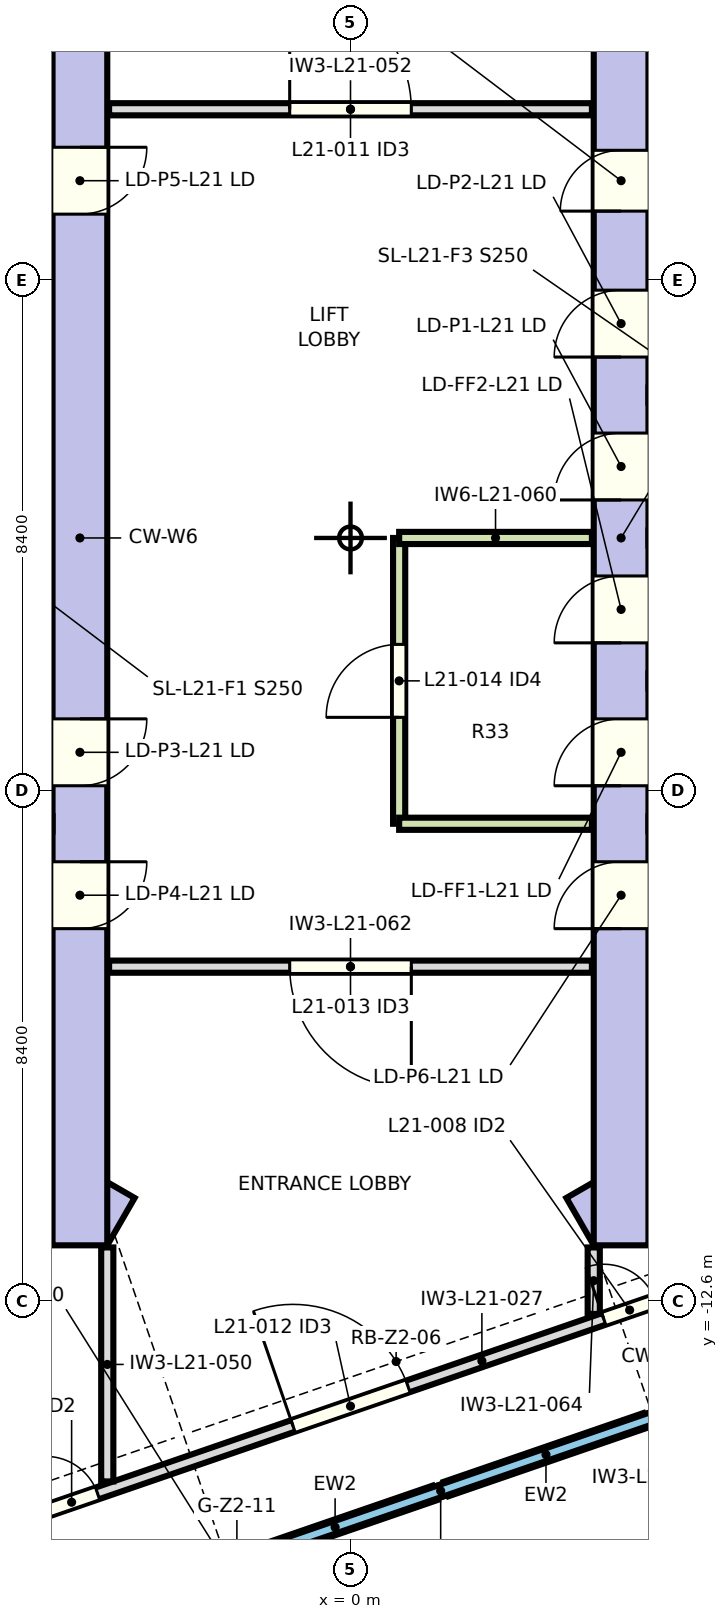
"""IFC4 building model, lengths in metres.
Left out: names, types, materials, properties, quantities, classifications, styles, units other than length and angle.
Written with IfcOpenShell. Run it as: python <this file> out.ifc"""

import sys

from ifc_helpers import new_model, si_unit, direction, frame, frame_2d, origin, place, context, subcontext, project, spatial, rectangle, extrude, element, fill, save


model = new_model("IFC4")
c1 = context("Model", 3, precision=1e-05, world=origin(), true_north=direction((0.0, 1.0)))
c2 = subcontext(c1, "Body", "Model", "MODEL_VIEW")
j1 = project(units=[si_unit("LENGTHUNIT", "METRE"), si_unit("PLANEANGLEUNIT", "RADIAN")], contexts=[c1])
p1 = place(None, origin())
s1 = spatial("IfcSite", under=j1, at=p1, CompositionType="ELEMENT")
p2 = place(p1, origin())
s2 = spatial("IfcBuilding", under=s1, at=p2, CompositionType="ELEMENT")
p3 = place(p2, frame((0.0, 0.0, 107.9)))
s3 = spatial("IfcBuildingStorey", under=s2, at=p3, CompositionType="ELEMENT", Elevation=107.9)
p4 = place(p3, frame((-3.775, -11.243, 0.0), z_axis=(0.0, 0.0, 1.0), x_axis=(-0.866026961591, 0.49999730179, 0.0)))
e1 = element("IfcWall", 1, at=p4, inside=s3, PredefinedType="SHEAR", context=c2, shape_type="SweptSolid", body=[
    extrude(rectangle(XDim=5.587, YDim=0.9, at=frame_2d((2.794, 0.0))), origin(), (0.0, 0.0, 1.0), 3.8),
])
p5 = place(p3, frame((-4.45, 11.633, 0.0), z_axis=(0.0, 0.0, 1.0), x_axis=(0.0, -1.0, 0.0)))
e2 = element("IfcWall", 2, at=p5, inside=s3, PredefinedType="SHEAR", context=c2, shape_type="SweptSolid", body=[
    extrude(rectangle(XDim=23.265, YDim=0.9, at=frame_2d((11.633, 0.0))), origin(), (0.0, 0.0, 1.0), 3.8),
])
p6 = place(p5, frame((14.607, 0.0, 0.0)))
e3 = element("IfcOpeningElement", 3, at=p6, cuts=e2, PredefinedType="OPENING", context=c2, shape_type="SweptSolid", body=[
    extrude(rectangle(XDim=1.1, YDim=2.1, at=frame_2d((0.55, 1.05))), frame((0.0, 0.46, 0.0), z_axis=(0.0, -1.0, 0.0), x_axis=(1.0, 0.0, 0.0)), (0.0, 0.0, 1.0), 0.92),
])
p7 = place(p5, frame((16.958, 0.0, 0.0)))
e4 = element("IfcOpeningElement", 4, at=p7, cuts=e2, PredefinedType="OPENING", context=c2, shape_type="SweptSolid", body=[
    extrude(rectangle(XDim=1.1, YDim=2.1, at=frame_2d((0.55, 1.05))), frame((0.0, 0.46, 0.0), z_axis=(0.0, -1.0, 0.0), x_axis=(1.0, 0.0, 0.0)), (0.0, 0.0, 1.0), 0.92),
])
p8 = place(p5, frame((5.208, 0.0, 0.0)))
e5 = element("IfcOpeningElement", 5, at=p8, cuts=e2, PredefinedType="OPENING", context=c2, shape_type="SweptSolid", body=[
    extrude(rectangle(XDim=1.1, YDim=2.1, at=frame_2d((0.55, 1.05))), frame((0.0, 0.46, 0.0), z_axis=(0.0, -1.0, 0.0), x_axis=(1.0, 0.0, 0.0)), (0.0, 0.0, 1.0), 0.92),
])
p9 = place(p3, frame((8.614, -8.449, 0.0), z_axis=(0.0, 0.0, 1.0), x_axis=(-0.866026961591, -0.49999730179, 0.0)))
e6 = element("IfcWall", 6, at=p9, inside=s3, PredefinedType="SHEAR", context=c2, shape_type="SweptSolid", body=[
    extrude(rectangle(XDim=5.587, YDim=0.9, at=frame_2d((2.794, 0.0))), origin(), (0.0, 0.0, 1.0), 3.8),
])
p10 = place(p3, frame((4.45, -11.633, 0.0), z_axis=(0.0, 0.0, 1.0), x_axis=(0.0, 1.0, 0.0)))
e7 = element("IfcWall", 7, at=p10, inside=s3, PredefinedType="SHEAR", context=c2, shape_type="SweptSolid", body=[
    extrude(rectangle(XDim=23.265, YDim=0.9, at=frame_2d((11.633, 0.0))), origin(), (0.0, 0.0, 1.0), 3.8),
])
p11 = place(p10, frame((7.558, 0.0, 0.0)))
e8 = element("IfcOpeningElement", 8, at=p11, cuts=e7, PredefinedType="OPENING", context=c2, shape_type="SweptSolid", body=[
    extrude(rectangle(XDim=1.1, YDim=2.1, at=frame_2d((0.55, 1.05))), frame((0.0, 0.46, 0.0), z_axis=(0.0, -1.0, 0.0), x_axis=(1.0, 0.0, 0.0)), (0.0, 0.0, 1.0), 0.92),
])
p12 = place(p10, frame((9.907, 0.0, 0.0)))
e9 = element("IfcOpeningElement", 9, at=p12, cuts=e7, PredefinedType="OPENING", context=c2, shape_type="SweptSolid", body=[
    extrude(rectangle(XDim=1.1, YDim=2.1, at=frame_2d((0.55, 1.05))), frame((0.0, 0.46, 0.0), z_axis=(0.0, -1.0, 0.0), x_axis=(1.0, 0.0, 0.0)), (0.0, 0.0, 1.0), 0.92),
])
p13 = place(p10, frame((12.258, 0.0, 0.0)))
e10 = element("IfcOpeningElement", 10, at=p13, cuts=e7, PredefinedType="OPENING", context=c2, shape_type="SweptSolid", body=[
    extrude(rectangle(XDim=1.1, YDim=2.1, at=frame_2d((0.55, 1.05))), frame((0.0, 0.46, 0.0), z_axis=(0.0, -1.0, 0.0), x_axis=(1.0, 0.0, 0.0)), (0.0, 0.0, 1.0), 0.92),
])
p14 = place(p10, frame((14.607, 0.0, 0.0)))
e11 = element("IfcOpeningElement", 11, at=p14, cuts=e7, PredefinedType="OPENING", context=c2, shape_type="SweptSolid", body=[
    extrude(rectangle(XDim=1.1, YDim=2.1, at=frame_2d((0.55, 1.05))), frame((0.0, 0.46, 0.0), z_axis=(0.0, -1.0, 0.0), x_axis=(1.0, 0.0, 0.0)), (0.0, 0.0, 1.0), 0.92),
])
p15 = place(p10, frame((5.208, 0.0, 0.0)))
e12 = element("IfcOpeningElement", 12, at=p15, cuts=e7, PredefinedType="OPENING", context=c2, shape_type="SweptSolid", body=[
    extrude(rectangle(XDim=1.1, YDim=2.1, at=frame_2d((0.55, 1.05))), frame((0.0, 0.46, 0.0), z_axis=(0.0, -1.0, 0.0), x_axis=(1.0, 0.0, 0.0)), (0.0, 0.0, 1.0), 0.92),
])
p16 = place(p10, frame((17.008, 0.0, 0.0)))
e13 = element("IfcOpeningElement", 13, at=p16, cuts=e7, PredefinedType="OPENING", context=c2, shape_type="SweptSolid", body=[
    extrude(rectangle(XDim=1.0, YDim=2.1, at=frame_2d((0.5, 1.05))), frame((0.0, 0.46, 0.0), z_axis=(0.0, -1.0, 0.0), x_axis=(1.0, 0.0, 0.0)), (0.0, 0.0, 1.0), 0.92),
])
p17 = place(p3, frame((-1.897, -16.835, 2.868), z_axis=(0.0, 0.0, 1.0), x_axis=(0.945520584071, 0.325562321375, 0.0)))
e14 = element("IfcWall", 14, at=p17, inside=s3, PredefinedType="SOLIDWALL", context=c2, shape_type="SweptSolid", body=[
    extrude(rectangle(XDim=3.478, YDim=0.25, at=frame_2d((1.739, 0.0))), origin(), (0.0, 0.0, 1.0), 0.632),
])
p18 = place(p3, frame((1.574, -15.639, 2.868), z_axis=(0.0, 0.0, 1.0), x_axis=(0.94551947433, 0.325565544343, 0.0)))
e15 = element("IfcWall", 15, at=p18, inside=s3, PredefinedType="SOLIDWALL", context=c2, shape_type="SweptSolid", body=[
    extrude(rectangle(XDim=3.469, YDim=0.25, at=frame_2d((1.734, 0.0))), origin(), (0.0, 0.0, 1.0), 0.632),
])
p19 = place(p3, frame((1.391, -15.703, 0.0), z_axis=(0.0, 0.0, 1.0), x_axis=(0.945359603561, 0.326029477127, 0.0)))
e16 = element("IfcWall", 16, at=p19, inside=s3, PredefinedType="PARTITIONING", context=c2, shape_type="SweptSolid", body=[
    extrude(rectangle(XDim=0.194, YDim=0.2, at=frame_2d((0.097, 0.0))), origin(), (0.0, 0.0, 1.0), 3.55),
])
p20 = place(p3, frame((4.854, -14.51, 0.0), z_axis=(0.0, 0.0, 1.0), x_axis=(0.945634074283, 0.325232528438, 0.0)))
e17 = element("IfcWall", 17, at=p20, inside=s3, PredefinedType="PARTITIONING", context=c2, shape_type="SweptSolid", body=[
    extrude(rectangle(XDim=0.268, YDim=0.2, at=frame_2d((0.134, 0.0))), origin(), (0.0, 0.0, 1.0), 3.55),
])
p21 = place(p3, frame((-11.49, -18.234, 0.0), z_axis=(0.0, 0.0, 1.0), x_axis=(0.945519622926, 0.325565112782, 0.0)))
e18 = element("IfcWall", 18, at=p21, inside=s3, PredefinedType="PARTITIONING", context=c2, shape_type="SweptSolid", body=[
    extrude(rectangle(XDim=28.873, YDim=0.2, at=frame_2d((14.437, 0.0))), origin(), (0.0, 0.0, 1.0), 3.55),
])
p22 = place(p21, frame((6.851, 0.0, 0.0)))
e19 = element("IfcOpeningElement", 19, at=p22, cuts=e18, PredefinedType="OPENING", context=c2, shape_type="SweptSolid", body=[
    extrude(rectangle(XDim=0.9, YDim=2.1, at=frame_2d((0.45, 1.05))), frame((0.0, 0.11, 0.0), z_axis=(0.0, -1.0, 0.0), x_axis=(1.0, 0.0, 0.0)), (0.0, 0.0, 1.0), 0.22),
])
p23 = place(p21, frame((16.557, 0.0, 0.0)))
e20 = element("IfcOpeningElement", 20, at=p23, cuts=e18, PredefinedType="OPENING", context=c2, shape_type="SweptSolid", body=[
    extrude(rectangle(XDim=0.9, YDim=2.1, at=frame_2d((0.45, 1.05))), frame((0.0, 0.11, 0.0), z_axis=(0.0, -1.0, 0.0), x_axis=(1.0, 0.0, 0.0)), (0.0, 0.0, 1.0), 0.22),
])
p24 = place(p21, frame((11.152, 0.0, 0.0)))
e21 = element("IfcOpeningElement", 21, at=p24, cuts=e18, PredefinedType="OPENING", context=c2, shape_type="SweptSolid", body=[
    extrude(rectangle(XDim=2.0, YDim=2.1, at=frame_2d((1.0, 1.05))), frame((0.0, 0.11, 0.0), z_axis=(0.0, -1.0, 0.0), x_axis=(1.0, 0.0, 0.0)), (0.0, 0.0, 1.0), 0.22),
])
p25 = place(p3, frame((-4.0, -11.667, 0.0), z_axis=(0.0, 0.0, 1.0), x_axis=(0.0, -1.0, 0.0)))
e22 = element("IfcWall", 22, at=p25, inside=s3, PredefinedType="PARTITIONING", context=c2, shape_type="SweptSolid", body=[
    extrude(rectangle(XDim=3.848, YDim=0.2, at=frame_2d((1.924, 0.0))), origin(), (0.0, 0.0, 1.0), 3.55),
])
p26 = place(p3, frame((-3.97, 7.05, 0.0), z_axis=(0.0, 0.0, 1.0), x_axis=(1.0, 0.0, 0.0)))
e23 = element("IfcWall", 23, at=p26, inside=s3, PredefinedType="PARTITIONING", context=c2, shape_type="SweptSolid", body=[
    extrude(rectangle(XDim=7.94, YDim=0.2, at=frame_2d((3.97, 0.0))), origin(), (0.0, 0.0, 1.0), 3.55),
])
p27 = place(p26, frame((2.97, 0.0, 0.0)))
e24 = element("IfcOpeningElement", 24, at=p27, cuts=e23, PredefinedType="OPENING", context=c2, shape_type="SweptSolid", body=[
    extrude(rectangle(XDim=2.0, YDim=2.1, at=frame_2d((1.0, 1.05))), frame((0.0, 0.11, 0.0), z_axis=(0.0, -1.0, 0.0), x_axis=(1.0, 0.0, 0.0)), (0.0, 0.0, 1.0), 0.22),
])
p28 = place(p3, frame((0.8, -4.7, 0.0), z_axis=(0.0, 0.0, 1.0), x_axis=(0.0, 1.0, 0.0)))
e25 = element("IfcWall", 25, at=p28, inside=s3, PredefinedType="SOLIDWALL", context=c2, shape_type="SweptSolid", body=[
    extrude(rectangle(XDim=4.7, YDim=0.2, at=frame_2d((2.35, 0.0))), origin(), (0.0, 0.0, 1.0), 3.55),
])
p29 = place(p28, frame((1.75, 0.0, 0.0)))
e26 = element("IfcOpeningElement", 26, at=p29, cuts=e25, PredefinedType="OPENING", context=c2, shape_type="SweptSolid", body=[
    extrude(rectangle(XDim=1.2, YDim=2.1, at=frame_2d((0.6, 1.05))), frame((0.0, 0.11, 0.0), z_axis=(0.0, -1.0, 0.0), x_axis=(1.0, 0.0, 0.0)), (0.0, 0.0, 1.0), 0.22),
])
p30 = place(p3, frame((0.8, 0.0, 0.0), z_axis=(0.0, 0.0, 1.0), x_axis=(1.0, 0.0, 0.0)))
e27 = element("IfcWall", 27, at=p30, inside=s3, PredefinedType="SOLIDWALL", context=c2, shape_type="SweptSolid", body=[
    extrude(rectangle(XDim=3.17, YDim=0.2, at=frame_2d((1.585, 0.0))), origin(), (0.0, 0.0, 1.0), 3.55),
])
p31 = place(p3, frame((3.97, -7.05, 0.0), z_axis=(0.0, 0.0, 1.0), x_axis=(-1.0, 0.0, 0.0)))
e28 = element("IfcWall", 28, at=p31, inside=s3, PredefinedType="PARTITIONING", context=c2, shape_type="SweptSolid", body=[
    extrude(rectangle(XDim=7.94, YDim=0.2, at=frame_2d((3.97, 0.0))), origin(), (0.0, 0.0, 1.0), 3.55),
])
p32 = place(p31, frame((2.97, 0.0, 0.0)))
e29 = element("IfcOpeningElement", 29, at=p32, cuts=e28, PredefinedType="OPENING", context=c2, shape_type="SweptSolid", body=[
    extrude(rectangle(XDim=2.0, YDim=2.1, at=frame_2d((1.0, 1.05))), frame((0.0, 0.11, 0.0), z_axis=(0.0, -1.0, 0.0), x_axis=(1.0, 0.0, 0.0)), (0.0, 0.0, 1.0), 0.22),
])
p33 = place(p3, frame((3.97, -4.7, 0.0), z_axis=(0.0, 0.0, 1.0), x_axis=(-1.0, 0.0, 0.0)))
e30 = element("IfcWall", 30, at=p33, inside=s3, PredefinedType="SOLIDWALL", context=c2, shape_type="SweptSolid", body=[
    extrude(rectangle(XDim=3.17, YDim=0.2, at=frame_2d((1.585, 0.0))), origin(), (0.0, 0.0, 1.0), 3.55),
])
p34 = place(p3, frame((4.0, -12.76, 0.0), z_axis=(0.0, 0.0, 1.0), x_axis=(0.0, 1.0, 0.0)))
e31 = element("IfcWall", 31, at=p34, inside=s3, PredefinedType="PARTITIONING", context=c2, shape_type="SweptSolid", body=[
    extrude(rectangle(XDim=1.093, YDim=0.2, at=frame_2d((0.547, 0.0))), origin(), (0.0, 0.0, 1.0), 3.55),
])
p35 = place(p3, frame((4.599, 15.862, 0.0), z_axis=(0.0, 0.0, 1.0), x_axis=(-0.94551912499, -0.325566558907, 0.0)))
e32 = element("IfcWall", 32, at=p35, inside=s3, PredefinedType="PARTITIONING", context=c2, shape_type="SweptSolid", body=[
    extrude(rectangle(XDim=26.293, YDim=0.2, at=frame_2d((13.146, 0.0))), origin(), (0.0, 0.0, 1.0), 3.55),
])
p36 = place(p35, frame((10.81, 0.0, 0.0)))
e33 = element("IfcOpeningElement", 33, at=p36, cuts=e32, PredefinedType="OPENING", context=c2, shape_type="SweptSolid", body=[
    extrude(rectangle(XDim=0.9, YDim=2.1, at=frame_2d((0.45, 1.05))), frame((0.0, 0.11, 0.0), z_axis=(0.0, -1.0, 0.0), x_axis=(1.0, 0.0, 0.0)), (0.0, 0.0, 1.0), 0.22),
])
p37 = place(p35, frame((5.979, 0.0, 0.0)))
e34 = element("IfcOpeningElement", 34, at=p37, cuts=e32, PredefinedType="OPENING", context=c2, shape_type="SweptSolid", body=[
    extrude(rectangle(XDim=2.0, YDim=2.1, at=frame_2d((1.0, 1.05))), frame((0.0, 0.11, 0.0), z_axis=(0.0, -1.0, 0.0), x_axis=(1.0, 0.0, 0.0)), (0.0, 0.0, 1.0), 0.22),
])
for number, where, z_axis, x_axis in (
    (35, (4.9, -4.7, 0.0), (0.0, 0.0, 1.0), (1.0, 0.0, 0.0)),
    (36, (4.9, 0.0, 0.0), (0.0, 0.0, 1.0), (1.0, 0.0, 0.0)),
):
    element("IfcWall", number, at=place(p3, frame(where, z_axis=z_axis, x_axis=x_axis)), inside=s3, PredefinedType="SOLIDWALL", context=c2, shape_type="SweptSolid", body=[
        extrude(rectangle(XDim=2.675, YDim=0.25, at=frame_2d((1.337, 0.0))), origin(), (0.0, 0.0, 1.0), 3.55),
    ])
p38 = place(p22, origin())
e37 = element("IfcDoor", 37, at=p38, inside=s3, OperationType="NOTDEFINED", PredefinedType="DOOR", context=c2, shape_type="SweptSolid", body=[
    extrude(rectangle(XDim=0.9, YDim=2.1, at=frame_2d((0.45, 1.05))), frame((0.0, 0.025, 0.0), z_axis=(0.0, -1.0, 0.0), x_axis=(1.0, 0.0, 0.0)), (0.0, 0.0, 1.0), 0.05),
])
fill(e19, e37)
p39 = place(p23, origin())
e38 = element("IfcDoor", 38, at=p39, inside=s3, OperationType="NOTDEFINED", PredefinedType="DOOR", context=c2, shape_type="SweptSolid", body=[
    extrude(rectangle(XDim=0.9, YDim=2.1, at=frame_2d((0.45, 1.05))), frame((0.0, 0.025, 0.0), z_axis=(0.0, -1.0, 0.0), x_axis=(1.0, 0.0, 0.0)), (0.0, 0.0, 1.0), 0.05),
])
fill(e20, e38)
p40 = place(p27, origin())
e39 = element("IfcDoor", 39, at=p40, inside=s3, OperationType="NOTDEFINED", PredefinedType="DOOR", context=c2, shape_type="SweptSolid", body=[
    extrude(rectangle(XDim=2.0, YDim=2.1, at=frame_2d((1.0, 1.05))), frame((0.0, 0.025, 0.0), z_axis=(0.0, -1.0, 0.0), x_axis=(1.0, 0.0, 0.0)), (0.0, 0.0, 1.0), 0.05),
])
fill(e24, e39)
p41 = place(p24, origin())
e40 = element("IfcDoor", 40, at=p41, inside=s3, OperationType="NOTDEFINED", PredefinedType="DOOR", context=c2, shape_type="SweptSolid", body=[
    extrude(rectangle(XDim=2.0, YDim=2.1, at=frame_2d((1.0, 1.05))), frame((0.0, 0.025, 0.0), z_axis=(0.0, -1.0, 0.0), x_axis=(1.0, 0.0, 0.0)), (0.0, 0.0, 1.0), 0.05),
])
fill(e21, e40)
p42 = place(p32, origin())
e41 = element("IfcDoor", 41, at=p42, inside=s3, OperationType="NOTDEFINED", PredefinedType="DOOR", context=c2, shape_type="SweptSolid", body=[
    extrude(rectangle(XDim=2.0, YDim=2.1, at=frame_2d((1.0, 1.05))), frame((0.0, 0.025, 0.0), z_axis=(0.0, -1.0, 0.0), x_axis=(1.0, 0.0, 0.0)), (0.0, 0.0, 1.0), 0.05),
])
fill(e29, e41)
p43 = place(p29, origin())
e42 = element("IfcDoor", 42, at=p43, inside=s3, OperationType="NOTDEFINED", PredefinedType="DOOR", context=c2, shape_type="SweptSolid", body=[
    extrude(rectangle(XDim=1.2, YDim=2.1, at=frame_2d((0.6, 1.05))), frame((0.0, 0.025, 0.0), z_axis=(0.0, -1.0, 0.0), x_axis=(1.0, 0.0, 0.0)), (0.0, 0.0, 1.0), 0.05),
])
fill(e26, e42)
p44 = place(p11, origin())
e43 = element("IfcDoor", 43, at=p44, inside=s3, OperationType="SLIDING_TO_LEFT", PredefinedType="DOOR", context=c2, shape_type="SweptSolid", body=[
    extrude(rectangle(XDim=1.1, YDim=2.1, at=frame_2d((0.55, 1.05))), frame((0.0, 0.025, 0.0), z_axis=(0.0, -1.0, 0.0), x_axis=(1.0, 0.0, 0.0)), (0.0, 0.0, 1.0), 0.05),
])
fill(e8, e43)
p45 = place(p12, origin())
e44 = element("IfcDoor", 44, at=p45, inside=s3, OperationType="SLIDING_TO_LEFT", PredefinedType="DOOR", context=c2, shape_type="SweptSolid", body=[
    extrude(rectangle(XDim=1.1, YDim=2.1, at=frame_2d((0.55, 1.05))), frame((0.0, 0.025, 0.0), z_axis=(0.0, -1.0, 0.0), x_axis=(1.0, 0.0, 0.0)), (0.0, 0.0, 1.0), 0.05),
])
fill(e9, e44)
p46 = place(p13, origin())
e45 = element("IfcDoor", 45, at=p46, inside=s3, OperationType="SLIDING_TO_LEFT", PredefinedType="DOOR", context=c2, shape_type="SweptSolid", body=[
    extrude(rectangle(XDim=1.1, YDim=2.1, at=frame_2d((0.55, 1.05))), frame((0.0, 0.025, 0.0), z_axis=(0.0, -1.0, 0.0), x_axis=(1.0, 0.0, 0.0)), (0.0, 0.0, 1.0), 0.05),
])
fill(e10, e45)
p47 = place(p14, origin())
e46 = element("IfcDoor", 46, at=p47, inside=s3, OperationType="SLIDING_TO_LEFT", PredefinedType="DOOR", context=c2, shape_type="SweptSolid", body=[
    extrude(rectangle(XDim=1.1, YDim=2.1, at=frame_2d((0.55, 1.05))), frame((0.0, 0.025, 0.0), z_axis=(0.0, -1.0, 0.0), x_axis=(1.0, 0.0, 0.0)), (0.0, 0.0, 1.0), 0.05),
])
fill(e11, e46)
p48 = place(p6, origin())
e47 = element("IfcDoor", 47, at=p48, inside=s3, OperationType="SLIDING_TO_LEFT", PredefinedType="DOOR", context=c2, shape_type="SweptSolid", body=[
    extrude(rectangle(XDim=1.1, YDim=2.1, at=frame_2d((0.55, 1.05))), frame((0.0, 0.025, 0.0), z_axis=(0.0, -1.0, 0.0), x_axis=(1.0, 0.0, 0.0)), (0.0, 0.0, 1.0), 0.05),
])
fill(e3, e47)
p49 = place(p7, origin())
e48 = element("IfcDoor", 48, at=p49, inside=s3, OperationType="SLIDING_TO_LEFT", PredefinedType="DOOR", context=c2, shape_type="SweptSolid", body=[
    extrude(rectangle(XDim=1.1, YDim=2.1, at=frame_2d((0.55, 1.05))), frame((0.0, 0.025, 0.0), z_axis=(0.0, -1.0, 0.0), x_axis=(1.0, 0.0, 0.0)), (0.0, 0.0, 1.0), 0.05),
])
fill(e4, e48)
p50 = place(p8, origin())
e49 = element("IfcDoor", 49, at=p50, inside=s3, OperationType="SLIDING_TO_LEFT", PredefinedType="DOOR", context=c2, shape_type="SweptSolid", body=[
    extrude(rectangle(XDim=1.1, YDim=2.1, at=frame_2d((0.55, 1.05))), frame((0.0, 0.025, 0.0), z_axis=(0.0, -1.0, 0.0), x_axis=(1.0, 0.0, 0.0)), (0.0, 0.0, 1.0), 0.05),
])
fill(e5, e49)
p51 = place(p15, origin())
e50 = element("IfcDoor", 50, at=p51, inside=s3, OperationType="SLIDING_TO_LEFT", PredefinedType="DOOR", context=c2, shape_type="SweptSolid", body=[
    extrude(rectangle(XDim=1.1, YDim=2.1, at=frame_2d((0.55, 1.05))), frame((0.0, 0.025, 0.0), z_axis=(0.0, -1.0, 0.0), x_axis=(1.0, 0.0, 0.0)), (0.0, 0.0, 1.0), 0.05),
])
fill(e12, e50)
p52 = place(p16, origin())
e51 = element("IfcDoor", 51, at=p52, inside=s3, OperationType="NOTDEFINED", PredefinedType="DOOR", context=c2, shape_type="SweptSolid", body=[
    extrude(rectangle(XDim=1.0, YDim=2.1, at=frame_2d((0.5, 1.05))), frame((0.0, 0.025, 0.0), z_axis=(0.0, -1.0, 0.0), x_axis=(1.0, 0.0, 0.0)), (0.0, 0.0, 1.0), 0.05),
])
fill(e13, e51)
save(model, sys.argv[1])
